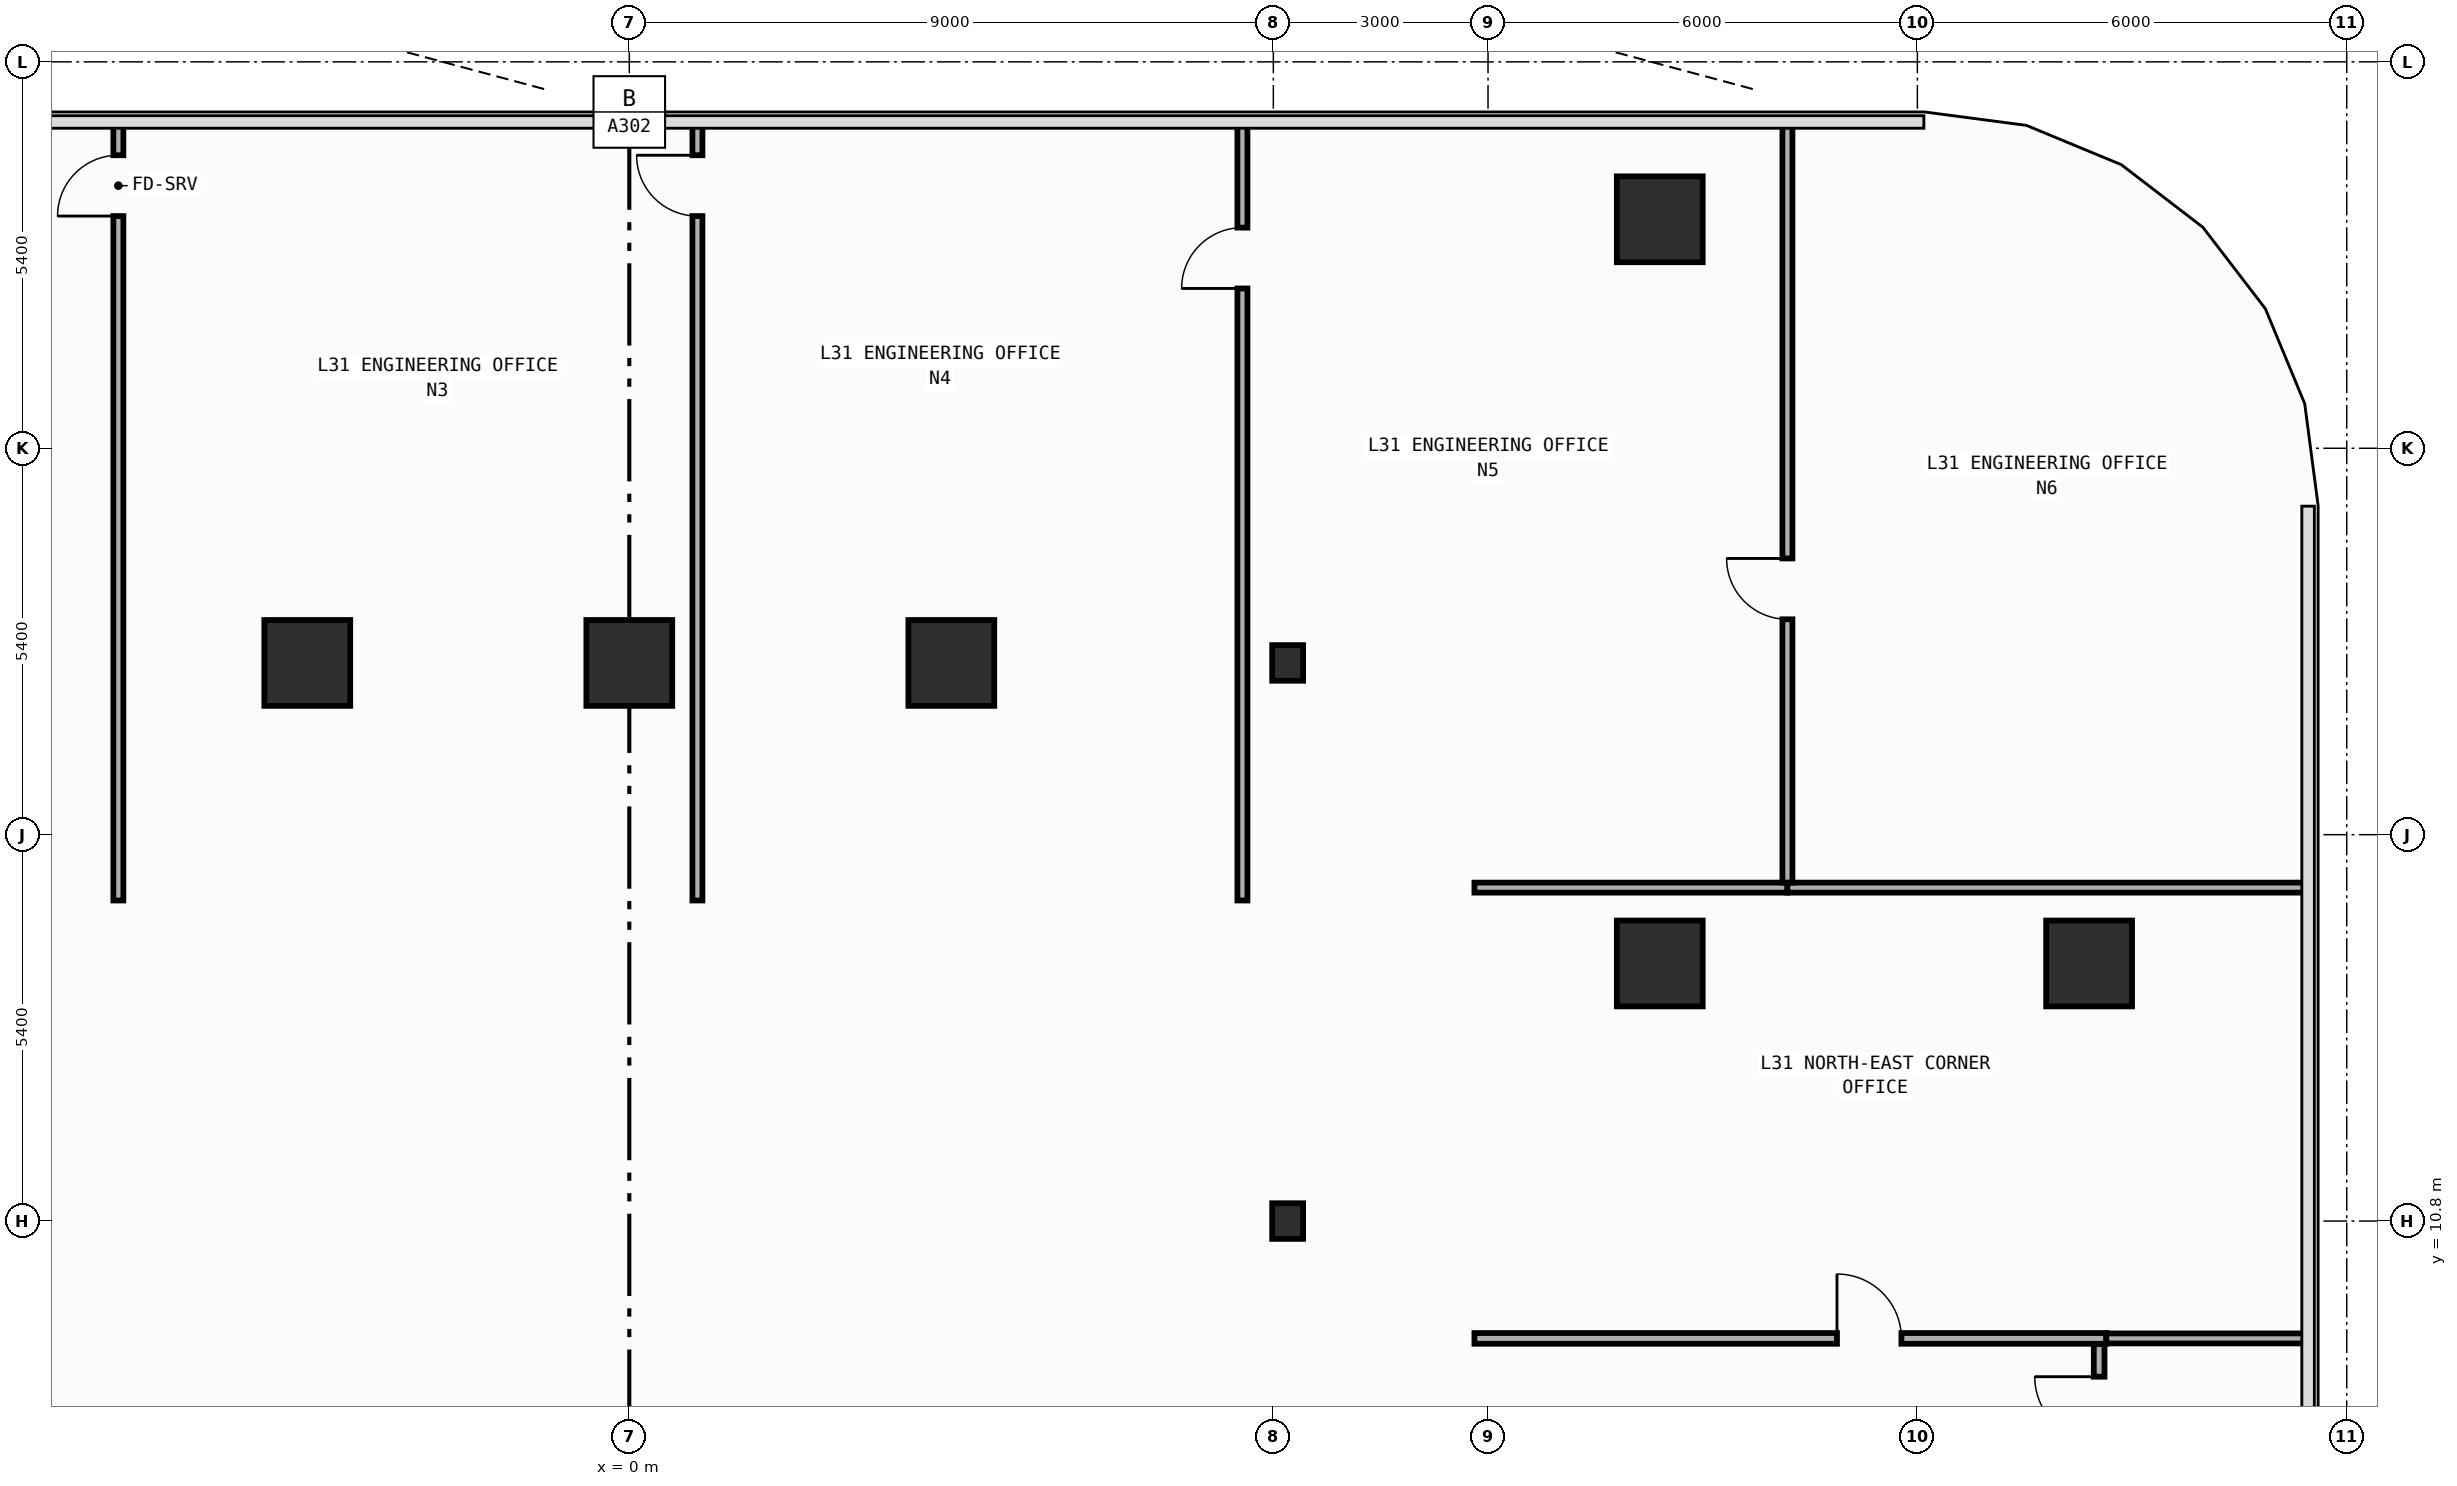
"""IFC4 building model, lengths in metres.
Left out: names, types, materials, properties, quantities, classifications, styles, units other than length and angle.
Written with IfcOpenShell. Run it as: python <this file> out.ifc"""

import sys

from ifc_helpers import new_model, si_unit, direction, frame, frame_2d, origin, origin_2d, place, context, subcontext, project, spatial, rectangle, i_section, extrude, element, fill, save


model = new_model("IFC4")
c1 = context("Model", 3, precision=1e-05, world=origin(), true_north=direction((0.0, 1.0)))
c2 = subcontext(c1, "Body", "Model", "MODEL_VIEW")
j1 = project(units=[si_unit("LENGTHUNIT", "METRE"), si_unit("PLANEANGLEUNIT", "RADIAN")], contexts=[c1])
p1 = place(None, origin())
s1 = spatial("IfcSite", under=j1, at=p1, CompositionType="ELEMENT")
p2 = place(p1, origin())
s2 = spatial("IfcBuilding", under=s1, at=p2, CompositionType="ELEMENT")
p3 = place(p2, frame((0.0, 0.0, 135.2)))
s3 = spatial("IfcBuildingStorey", under=s2, at=p3, CompositionType="ELEMENT", Elevation=135.2)
for number, where, z_axis, x_axis in (
    (1, (9.2, 10.8, 0.0), (0.0, 0.0, 1.0), (1.0, 0.0, 0.0)),
    (2, (9.2, 18.6, 0.0), (0.0, 0.0, 1.0), (1.0, 0.0, 0.0)),
):
    element("IfcColumn", number, at=place(p3, frame(where, z_axis=z_axis, x_axis=x_axis)), inside=s3, PredefinedType="COLUMN", context=c2, shape_type="SweptSolid", body=[
        extrude(i_section(OverallWidth=0.432, OverallDepth=0.498, WebThickness=0.045, FlangeThickness=0.07, FilletRadius=0.022, at=origin_2d()), origin(), (0.0, 0.0, 1.0), 4.2),
    ])
for number, where, z_axis, x_axis in (
    (3, (20.4, 14.4, 0.0), (0.0, 0.0, 1.0), (1.0, 0.0, 0.0)),
    (4, (14.4, 14.4, 0.0), (0.0, 0.0, 1.0), (1.0, 0.0, 0.0)),
    (5, (-4.5, 18.6, 0.0), (0.0, 0.0, 1.0), (1.0, 0.0, 0.0)),
    (6, (0.0, 18.6, 0.0), (0.0, 0.0, 1.0), (1.0, 0.0, 0.0)),
    (7, (4.5, 18.6, 0.0), (0.0, 0.0, 1.0), (1.0, 0.0, 0.0)),
    (8, (14.4, 24.8, 0.0), (0.0, 0.0, 1.0), (1.0, 0.0, 0.0)),
):
    element("IfcColumn", number, at=place(p3, frame(where, z_axis=z_axis, x_axis=x_axis)), inside=s3, PredefinedType="COLUMN", context=c2, shape_type="SweptSolid", body=[
        extrude(rectangle(XDim=1.2, YDim=1.2, at=origin_2d()), origin(), (0.0, 0.0, 1.0), 4.2),
    ])
p4 = place(p3, frame((20.54, 7.06, 0.0), z_axis=(0.0, 0.0, 1.0), x_axis=(0.0, 1.0, 0.0)))
e9 = element("IfcWall", 9, at=p4, inside=s3, PredefinedType="PARTITIONING", context=c2, shape_type="SweptSolid", body=[
    extrude(rectangle(XDim=2.025, YDim=0.15, at=frame_2d((1.012, 0.0))), origin(), (0.0, 0.0, 1.0), 3.94),
])
p5 = place(p4, frame((0.665, 0.0, 0.0)))
e10 = element("IfcOpeningElement", 10, at=p5, cuts=e9, PredefinedType="OPENING", context=c2, shape_type="SweptSolid", body=[
    extrude(rectangle(XDim=0.9, YDim=2.15, at=frame_2d((0.45, 1.075))), frame((0.0, 0.085, 0.0), z_axis=(0.0, -1.0, 0.0), x_axis=(1.0, 0.0, 0.0)), (0.0, 0.0, 1.0), 0.17),
])
p6 = place(p3, frame((11.81, 9.16, 0.0), z_axis=(0.0, 0.0, 1.0), x_axis=(1.0, 0.0, 0.0)))
e11 = element("IfcWall", 11, at=p6, inside=s3, PredefinedType="PARTITIONING", context=c2, shape_type="SweptSolid", body=[
    extrude(rectangle(XDim=8.83, YDim=0.15, at=frame_2d((4.415, 0.0))), origin(), (0.0, 0.0, 1.0), 3.94),
])
p7 = place(p6, frame((5.067, 0.0, 0.0)))
e12 = element("IfcOpeningElement", 12, at=p7, cuts=e11, PredefinedType="OPENING", context=c2, shape_type="SweptSolid", body=[
    extrude(rectangle(XDim=0.9, YDim=2.15, at=frame_2d((0.45, 1.075))), frame((0.0, 0.085, 0.0), z_axis=(0.0, -1.0, 0.0), x_axis=(1.0, 0.0, 0.0)), (0.0, 0.0, 1.0), 0.17),
])
p8 = place(p3, frame((20.64, 9.16, 0.0), z_axis=(0.0, 0.0, 1.0), x_axis=(1.0, 0.0, 0.0)))
e13 = element("IfcWall", 13, at=p8, inside=s3, PredefinedType="PARTITIONING", context=c2, shape_type="SweptSolid", body=[
    extrude(rectangle(XDim=2.815, YDim=0.14, at=frame_2d((1.408, 0.0))), origin(), (0.0, 0.0, 1.0), 3.94),
])
p9 = place(p3, frame((11.81, 15.46, 0.0), z_axis=(0.0, 0.0, 1.0), x_axis=(1.0, 0.0, 0.0)))
e14 = element("IfcWall", 14, at=p9, inside=s3, PredefinedType="PARTITIONING", context=c2, shape_type="SweptSolid", body=[
    extrude(rectangle(XDim=4.374, YDim=0.14, at=frame_2d((2.187, 0.0))), origin(), (0.0, 0.0, 1.0), 3.94),
])
p10 = place(p3, frame((16.184, 15.46, 0.0), z_axis=(0.0, 0.0, 1.0), x_axis=(1.0, 0.0, 0.0)))
e15 = element("IfcWall", 15, at=p10, inside=s3, PredefinedType="PARTITIONING", context=c2, shape_type="SweptSolid", body=[
    extrude(rectangle(XDim=7.271, YDim=0.14, at=frame_2d((3.635, 0.0))), origin(), (0.0, 0.0, 1.0), 3.94),
])
p11 = place(p3, frame((-7.14, 15.28, 0.0), z_axis=(0.0, 0.0, 1.0), x_axis=(0.0, 1.0, 0.0)))
e16 = element("IfcWall", 16, at=p11, inside=s3, PredefinedType="PARTITIONING", context=c2, shape_type="SweptSolid", body=[
    extrude(rectangle(XDim=10.875, YDim=0.14, at=frame_2d((5.438, 0.0))), origin(), (0.0, 0.0, 1.0), 3.94),
])
p12 = place(p11, frame((9.565, 0.0, 0.0)))
e17 = element("IfcOpeningElement", 17, at=p12, cuts=e16, PredefinedType="OPENING", context=c2, shape_type="SweptSolid", body=[
    extrude(rectangle(XDim=0.85, YDim=2.1, at=frame_2d((0.425, 1.05))), frame((0.0, 0.08, 0.0), z_axis=(0.0, -1.0, 0.0), x_axis=(1.0, 0.0, 0.0)), (0.0, 0.0, 1.0), 0.16),
])
p13 = place(p3, frame((0.952, 15.28, 0.0), z_axis=(0.0, 0.0, 1.0), x_axis=(0.0, 1.0, 0.0)))
e18 = element("IfcWall", 18, at=p13, inside=s3, PredefinedType="PARTITIONING", context=c2, shape_type="SweptSolid", body=[
    extrude(rectangle(XDim=10.875, YDim=0.14, at=frame_2d((5.438, 0.0))), origin(), (0.0, 0.0, 1.0), 3.94),
])
p14 = place(p13, frame((9.565, 0.0, 0.0)))
e19 = element("IfcOpeningElement", 19, at=p14, cuts=e18, PredefinedType="OPENING", context=c2, shape_type="SweptSolid", body=[
    extrude(rectangle(XDim=0.85, YDim=2.1, at=frame_2d((0.425, 1.05))), frame((0.0, 0.08, 0.0), z_axis=(0.0, -1.0, 0.0), x_axis=(1.0, 0.0, 0.0)), (0.0, 0.0, 1.0), 0.16),
])
p15 = place(p3, frame((8.568, 15.28, 0.0), z_axis=(0.0, 0.0, 1.0), x_axis=(0.0, 1.0, 0.0)))
e20 = element("IfcWall", 20, at=p15, inside=s3, PredefinedType="PARTITIONING", context=c2, shape_type="SweptSolid", body=[
    extrude(rectangle(XDim=10.875, YDim=0.14, at=frame_2d((5.438, 0.0))), origin(), (0.0, 0.0, 1.0), 3.94),
])
p16 = place(p15, frame((8.553, 0.0, 0.0)))
e21 = element("IfcOpeningElement", 21, at=p16, cuts=e20, PredefinedType="OPENING", context=c2, shape_type="SweptSolid", body=[
    extrude(rectangle(XDim=0.85, YDim=2.1, at=frame_2d((0.425, 1.05))), frame((0.0, 0.08, 0.0), z_axis=(0.0, -1.0, 0.0), x_axis=(1.0, 0.0, 0.0)), (0.0, 0.0, 1.0), 0.16),
])
p17 = place(p3, frame((16.184, 15.53, 0.0), z_axis=(0.0, 0.0, 1.0), x_axis=(0.0, 1.0, 0.0)))
e22 = element("IfcWall", 22, at=p17, inside=s3, PredefinedType="PARTITIONING", context=c2, shape_type="SweptSolid", body=[
    extrude(rectangle(XDim=10.625, YDim=0.14, at=frame_2d((5.312, 0.0))), origin(), (0.0, 0.0, 1.0), 3.94),
])
p18 = place(p17, frame((3.68, 0.0, 0.0)))
e23 = element("IfcOpeningElement", 23, at=p18, cuts=e22, PredefinedType="OPENING", context=c2, shape_type="SweptSolid", body=[
    extrude(rectangle(XDim=0.85, YDim=2.1, at=frame_2d((0.425, 1.05))), frame((0.0, 0.08, 0.0), z_axis=(0.0, -1.0, 0.0), x_axis=(1.0, 0.0, 0.0)), (0.0, 0.0, 1.0), 0.16),
])
p19 = place(p5, origin())
e24 = element("IfcDoor", 24, at=p19, inside=s3, OperationType="SINGLE_SWING_RIGHT", PredefinedType="DOOR", context=c2, shape_type="SweptSolid", body=[
    extrude(rectangle(XDim=0.9, YDim=2.15, at=frame_2d((0.45, 1.075))), frame((0.0, 0.025, 0.0), z_axis=(0.0, -1.0, 0.0), x_axis=(1.0, 0.0, 0.0)), (0.0, 0.0, 1.0), 0.05),
])
fill(e10, e24)
p20 = place(p7, origin())
e25 = element("IfcDoor", 25, at=p20, inside=s3, OperationType="SINGLE_SWING_LEFT", PredefinedType="DOOR", context=c2, shape_type="SweptSolid", body=[
    extrude(rectangle(XDim=0.9, YDim=2.15, at=frame_2d((0.45, 1.075))), frame((0.0, 0.025, 0.0), z_axis=(0.0, -1.0, 0.0), x_axis=(1.0, 0.0, 0.0)), (0.0, 0.0, 1.0), 0.05),
])
fill(e12, e25)
p21 = place(p12, origin())
e26 = element("IfcDoor", 26, at=p21, inside=s3, OperationType="SINGLE_SWING_LEFT", PredefinedType="DOOR", context=c2, shape_type="SweptSolid", body=[
    extrude(rectangle(XDim=0.85, YDim=2.1, at=frame_2d((0.425, 1.05))), frame((0.0, 0.025, 0.0), z_axis=(0.0, -1.0, 0.0), x_axis=(1.0, 0.0, 0.0)), (0.0, 0.0, 1.0), 0.05),
])
fill(e17, e26)
p22 = place(p14, origin())
e27 = element("IfcDoor", 27, at=p22, inside=s3, OperationType="SINGLE_SWING_RIGHT", PredefinedType="DOOR", context=c2, shape_type="SweptSolid", body=[
    extrude(rectangle(XDim=0.85, YDim=2.1, at=frame_2d((0.425, 1.05))), frame((0.0, 0.025, 0.0), z_axis=(0.0, -1.0, 0.0), x_axis=(1.0, 0.0, 0.0)), (0.0, 0.0, 1.0), 0.05),
])
fill(e19, e27)
p23 = place(p16, origin())
e28 = element("IfcDoor", 28, at=p23, inside=s3, OperationType="SINGLE_SWING_LEFT", PredefinedType="DOOR", context=c2, shape_type="SweptSolid", body=[
    extrude(rectangle(XDim=0.85, YDim=2.1, at=frame_2d((0.425, 1.05))), frame((0.0, 0.025, 0.0), z_axis=(0.0, -1.0, 0.0), x_axis=(1.0, 0.0, 0.0)), (0.0, 0.0, 1.0), 0.05),
])
fill(e21, e28)
p24 = place(p18, origin())
e29 = element("IfcDoor", 29, at=p24, inside=s3, OperationType="SINGLE_SWING_RIGHT", PredefinedType="DOOR", context=c2, shape_type="SweptSolid", body=[
    extrude(rectangle(XDim=0.85, YDim=2.1, at=frame_2d((0.425, 1.05))), frame((0.0, 0.025, 0.0), z_axis=(0.0, -1.0, 0.0), x_axis=(1.0, 0.0, 0.0)), (0.0, 0.0, 1.0), 0.05),
])
fill(e23, e29)
save(model, sys.argv[1])
